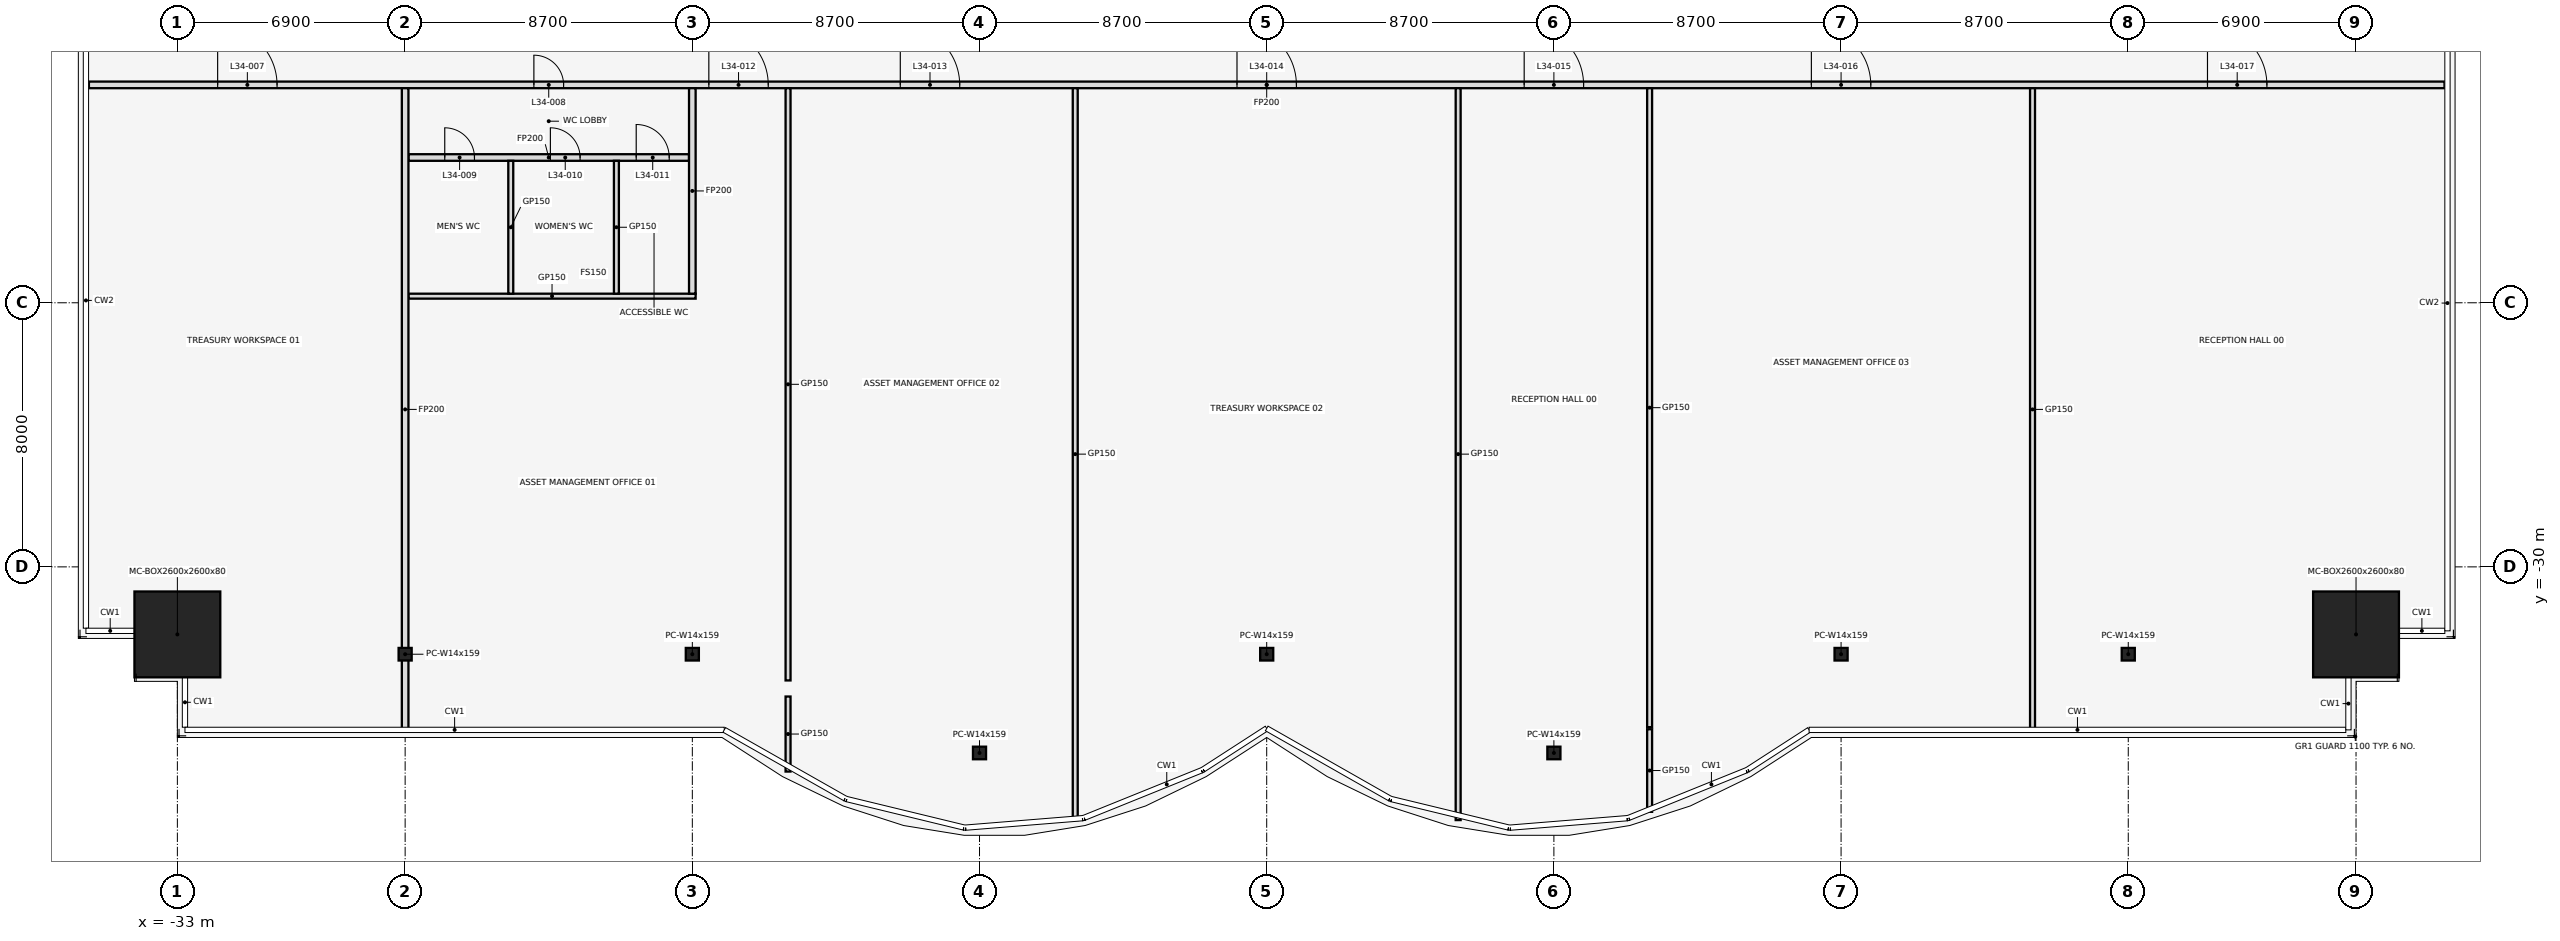
"""IFC4 building model, lengths in metres.
Left out: names, types, materials, properties, quantities, classifications, styles, units other than length and angle.
Written with IfcOpenShell. Run it as: python <this file> out.ifc"""

import sys

from ifc_helpers import new_model, si_unit, direction, frame, frame_2d, origin, origin_2d, place, context, subcontext, project, spatial, rectangle, hollow_rectangle, i_section, extrude, element, fill, save


model = new_model("IFC4")
c1 = context("Model", 3, precision=1e-05, world=origin(), true_north=direction((0.0, 1.0)))
c2 = subcontext(c1, "Body", "Model", "MODEL_VIEW")
j1 = project(units=[si_unit("LENGTHUNIT", "METRE"), si_unit("PLANEANGLEUNIT", "RADIAN")], contexts=[c1])
p1 = place(None, origin())
s1 = spatial("IfcSite", under=j1, at=p1, CompositionType="ELEMENT")
p2 = place(p1, origin())
s2 = spatial("IfcBuilding", under=s1, at=p2, CompositionType="ELEMENT")
p3 = place(p2, frame((0.0, 0.0, 156.8)))
s3 = spatial("IfcBuildingStorey", under=s2, at=p3, CompositionType="ELEMENT", Elevation=156.8)
p4 = place(p3, frame((-33.0, -32.046, 0.0), z_axis=(0.0, 0.0, 1.0), x_axis=(1.0, 0.0, 0.0)))
e1 = element("IfcColumn", 1, at=p4, inside=s3, PredefinedType="COLUMN", context=c2, shape_type="SweptSolid", body=[
    extrude(hollow_rectangle(XDim=2.6, YDim=2.6, WallThickness=0.08, at=origin_2d()), origin(), (0.0, 0.0, 1.0), 4.1),
])
for number, where, z_axis, x_axis in (
    (2, (-26.1, -32.646, 0.0), (0.0, 0.0, 1.0), (1.0, 0.0, 0.0)),
    (3, (-17.4, -32.646, 0.0), (0.0, 0.0, 1.0), (1.0, 0.0, 0.0)),
    (4, (-8.7, -35.637, 0.0), (0.0, 0.0, 1.0), (1.0, 0.0, 0.0)),
    (5, (0.0, -32.646, 0.0), (0.0, 0.0, 1.0), (1.0, 0.0, 0.0)),
    (6, (8.7, -35.637, 0.0), (0.0, 0.0, 1.0), (1.0, 0.0, 0.0)),
    (7, (17.4, -32.646, 0.0), (0.0, 0.0, 1.0), (1.0, 0.0, 0.0)),
    (8, (26.1, -32.646, 0.0), (0.0, 0.0, 1.0), (1.0, 0.0, 0.0)),
):
    element("IfcColumn", number, at=place(p3, frame(where, z_axis=z_axis, x_axis=x_axis)), inside=s3, PredefinedType="COLUMN", context=c2, shape_type="SweptSolid", body=[
        extrude(i_section(OverallWidth=0.396, OverallDepth=0.381, WebThickness=0.019, FlangeThickness=0.03, at=origin_2d()), origin(), (0.0, 0.0, 1.0), 4.1),
    ])
p5 = place(p3, frame((33.0, -32.046, 0.0), z_axis=(0.0, 0.0, 1.0), x_axis=(1.0, 0.0, 0.0)))
e9 = element("IfcColumn", 9, at=p5, inside=s3, PredefinedType="COLUMN", context=c2, shape_type="SweptSolid", body=[
    extrude(hollow_rectangle(XDim=2.6, YDim=2.6, WallThickness=0.08, at=origin_2d()), origin(), (0.0, 0.0, 1.0), 4.1),
])
p6 = place(p3, frame((-26.0, -21.8, 0.0), z_axis=(0.0, 0.0, 1.0), x_axis=(1.0, 0.0, 0.0)))
e10 = element("IfcWall", 10, at=p6, inside=s3, PredefinedType="PARTITIONING", context=c2, shape_type="SweptSolid", body=[
    extrude(rectangle(XDim=8.7, YDim=0.15, at=frame_2d((4.35, 0.0))), origin(), (0.0, 0.0, 1.0), 2.84),
])
p7 = place(p3, frame((-26.0, -17.6, 0.0), z_axis=(0.0, 0.0, 1.0), x_axis=(1.0, 0.0, 0.0)))
e11 = element("IfcWall", 11, at=p7, inside=s3, PredefinedType="PARTITIONING", context=c2, shape_type="SweptSolid", body=[
    extrude(rectangle(XDim=8.5, YDim=0.2, at=frame_2d((4.25, 0.0))), origin(), (0.0, 0.0, 1.0), 2.84),
])
p8 = place(p7, frame((1.1, 0.0, 0.0)))
e12 = element("IfcOpeningElement", 12, at=p8, cuts=e11, PredefinedType="OPENING", context=c2, shape_type="SweptSolid", body=[
    extrude(rectangle(XDim=0.9, YDim=2.1, at=frame_2d((0.45, 1.05))), frame((0.0, 0.112, 0.0), z_axis=(0.0, -1.0, 0.0), x_axis=(1.0, 0.0, 0.0)), (0.0, 0.0, 1.0), 0.224),
])
p9 = place(p7, frame((4.3, 0.0, 0.0)))
e13 = element("IfcOpeningElement", 13, at=p9, cuts=e11, PredefinedType="OPENING", context=c2, shape_type="SweptSolid", body=[
    extrude(rectangle(XDim=0.9, YDim=2.1, at=frame_2d((0.45, 1.05))), frame((0.0, 0.112, 0.0), z_axis=(0.0, -1.0, 0.0), x_axis=(1.0, 0.0, 0.0)), (0.0, 0.0, 1.0), 0.224),
])
p10 = place(p7, frame((6.9, 0.0, 0.0)))
e14 = element("IfcOpeningElement", 14, at=p10, cuts=e11, PredefinedType="OPENING", context=c2, shape_type="SweptSolid", body=[
    extrude(rectangle(XDim=1.0, YDim=2.1, at=frame_2d((0.5, 1.05))), frame((0.0, 0.112, 0.0), z_axis=(0.0, -1.0, 0.0), x_axis=(1.0, 0.0, 0.0)), (0.0, 0.0, 1.0), 0.224),
])
p11 = place(p3, frame((-35.68, -15.4, 0.0), z_axis=(0.0, 0.0, 1.0), x_axis=(1.0, 0.0, 0.0)))
e15 = element("IfcWall", 15, at=p11, inside=s3, PredefinedType="PARTITIONING", context=c2, shape_type="SweptSolid", body=[
    extrude(rectangle(XDim=71.36, YDim=0.2, at=frame_2d((35.68, 0.0))), origin(), (0.0, 0.0, 1.0), 2.84),
])
p12 = place(p11, frame((3.9, 0.0, 0.0)))
e16 = element("IfcOpeningElement", 16, at=p12, cuts=e15, PredefinedType="OPENING", context=c2, shape_type="SweptSolid", body=[
    extrude(rectangle(XDim=1.8, YDim=2.1, at=frame_2d((0.9, 1.05))), frame((0.0, 0.112, 0.0), z_axis=(0.0, -1.0, 0.0), x_axis=(1.0, 0.0, 0.0)), (0.0, 0.0, 1.0), 0.224),
])
p13 = place(p11, frame((13.48, 0.0, 0.0)))
e17 = element("IfcOpeningElement", 17, at=p13, cuts=e15, PredefinedType="OPENING", context=c2, shape_type="SweptSolid", body=[
    extrude(rectangle(XDim=0.9, YDim=2.1, at=frame_2d((0.45, 1.05))), frame((0.0, 0.112, 0.0), z_axis=(0.0, -1.0, 0.0), x_axis=(1.0, 0.0, 0.0)), (0.0, 0.0, 1.0), 0.224),
])
p14 = place(p11, frame((18.78, 0.0, 0.0)))
e18 = element("IfcOpeningElement", 18, at=p14, cuts=e15, PredefinedType="OPENING", context=c2, shape_type="SweptSolid", body=[
    extrude(rectangle(XDim=1.8, YDim=2.1, at=frame_2d((0.9, 1.05))), frame((0.0, 0.112, 0.0), z_axis=(0.0, -1.0, 0.0), x_axis=(1.0, 0.0, 0.0)), (0.0, 0.0, 1.0), 0.224),
])
p15 = place(p11, frame((24.58, 0.0, 0.0)))
e19 = element("IfcOpeningElement", 19, at=p15, cuts=e15, PredefinedType="OPENING", context=c2, shape_type="SweptSolid", body=[
    extrude(rectangle(XDim=1.8, YDim=2.1, at=frame_2d((0.9, 1.05))), frame((0.0, 0.112, 0.0), z_axis=(0.0, -1.0, 0.0), x_axis=(1.0, 0.0, 0.0)), (0.0, 0.0, 1.0), 0.224),
])
p16 = place(p11, frame((34.78, 0.0, 0.0)))
e20 = element("IfcOpeningElement", 20, at=p16, cuts=e15, PredefinedType="OPENING", context=c2, shape_type="SweptSolid", body=[
    extrude(rectangle(XDim=1.8, YDim=2.1, at=frame_2d((0.9, 1.05))), frame((0.0, 0.112, 0.0), z_axis=(0.0, -1.0, 0.0), x_axis=(1.0, 0.0, 0.0)), (0.0, 0.0, 1.0), 0.224),
])
p17 = place(p11, frame((43.48, 0.0, 0.0)))
e21 = element("IfcOpeningElement", 21, at=p17, cuts=e15, PredefinedType="OPENING", context=c2, shape_type="SweptSolid", body=[
    extrude(rectangle(XDim=1.8, YDim=2.1, at=frame_2d((0.9, 1.05))), frame((0.0, 0.112, 0.0), z_axis=(0.0, -1.0, 0.0), x_axis=(1.0, 0.0, 0.0)), (0.0, 0.0, 1.0), 0.224),
])
p18 = place(p11, frame((52.18, 0.0, 0.0)))
e22 = element("IfcOpeningElement", 22, at=p18, cuts=e15, PredefinedType="OPENING", context=c2, shape_type="SweptSolid", body=[
    extrude(rectangle(XDim=1.8, YDim=2.1, at=frame_2d((0.9, 1.05))), frame((0.0, 0.112, 0.0), z_axis=(0.0, -1.0, 0.0), x_axis=(1.0, 0.0, 0.0)), (0.0, 0.0, 1.0), 0.224),
])
p19 = place(p11, frame((64.18, 0.0, 0.0)))
e23 = element("IfcOpeningElement", 23, at=p19, cuts=e15, PredefinedType="OPENING", context=c2, shape_type="SweptSolid", body=[
    extrude(rectangle(XDim=1.8, YDim=2.1, at=frame_2d((0.9, 1.05))), frame((0.0, 0.112, 0.0), z_axis=(0.0, -1.0, 0.0), x_axis=(1.0, 0.0, 0.0)), (0.0, 0.0, 1.0), 0.224),
])
p20 = place(p3, frame((-26.1, -34.96, 0.0), z_axis=(0.0, 0.0, 1.0), x_axis=(0.0, 1.0, 0.0)))
e24 = element("IfcWall", 24, at=p20, inside=s3, PredefinedType="PARTITIONING", context=c2, shape_type="SweptSolid", body=[
    extrude(rectangle(XDim=19.46, YDim=0.2, at=frame_2d((9.73, 0.0))), origin(), (0.0, 0.0, 1.0), 2.84),
])
for number, where, z_axis, x_axis in (
    (25, (-22.9, -21.725, 0.0), (0.0, 0.0, 1.0), (0.0, 1.0, 0.0)),
    (26, (-19.7, -21.725, 0.0), (0.0, 0.0, 1.0), (0.0, 1.0, 0.0)),
):
    element("IfcWall", number, at=place(p3, frame(where, z_axis=z_axis, x_axis=x_axis)), inside=s3, PredefinedType="PARTITIONING", context=c2, shape_type="SweptSolid", body=[
        extrude(rectangle(XDim=4.025, YDim=0.15, at=frame_2d((2.013, 0.0))), origin(), (0.0, 0.0, 1.0), 2.84),
    ])
p21 = place(p3, frame((-17.4, -21.725, 0.0), z_axis=(0.0, 0.0, 1.0), x_axis=(0.0, 1.0, 0.0)))
e27 = element("IfcWall", 27, at=p21, inside=s3, PredefinedType="PARTITIONING", context=c2, shape_type="SweptSolid", body=[
    extrude(rectangle(XDim=6.225, YDim=0.2, at=frame_2d((3.113, 0.0))), origin(), (0.0, 0.0, 1.0), 2.84),
])
p22 = place(p3, frame((-14.5, -36.2, 0.0), z_axis=(0.0, 0.0, 1.0), x_axis=(0.0, 1.0, 0.0)))
e28 = element("IfcWall", 28, at=p22, inside=s3, PredefinedType="PARTITIONING", context=c2, shape_type="SweptSolid", body=[
    extrude(rectangle(XDim=2.272, YDim=0.15, at=frame_2d((1.136, 0.0))), origin(), (0.0, 0.0, 1.0), 2.84),
])
p23 = place(p3, frame((-14.5, -33.44, 0.0), z_axis=(0.0, 0.0, 1.0), x_axis=(0.0, 1.0, 0.0)))
e29 = element("IfcWall", 29, at=p23, inside=s3, PredefinedType="PARTITIONING", context=c2, shape_type="SweptSolid", body=[
    extrude(rectangle(XDim=17.94, YDim=0.15, at=frame_2d((8.97, 0.0))), origin(), (0.0, 0.0, 1.0), 2.84),
])
for number, where, z_axis, x_axis in (
    (30, (-5.8, -37.67, 0.0), (0.0, 0.0, 1.0), (0.0, 1.0, 0.0)),
    (31, (5.8, -37.67, 0.0), (0.0, 0.0, 1.0), (0.0, 1.0, 0.0)),
):
    element("IfcWall", number, at=place(p3, frame(where, z_axis=z_axis, x_axis=x_axis)), inside=s3, PredefinedType="PARTITIONING", context=c2, shape_type="SweptSolid", body=[
        extrude(rectangle(XDim=22.17, YDim=0.15, at=frame_2d((11.085, 0.0))), origin(), (0.0, 0.0, 1.0), 2.84),
    ])
p24 = place(p3, frame((11.6, -37.42, 0.0), z_axis=(0.0, 0.0, 1.0), x_axis=(0.0, 1.0, 0.0)))
e32 = element("IfcWall", 32, at=p24, inside=s3, PredefinedType="PARTITIONING", context=c2, shape_type="SweptSolid", body=[
    extrude(rectangle(XDim=2.502, YDim=0.15, at=frame_2d((1.251, 0.0))), origin(), (0.0, 0.0, 1.0), 2.84),
])
p25 = place(p3, frame((11.6, -34.855, 0.0), z_axis=(0.0, 0.0, 1.0), x_axis=(0.0, 1.0, 0.0)))
e33 = element("IfcWall", 33, at=p25, inside=s3, PredefinedType="PARTITIONING", context=c2, shape_type="SweptSolid", body=[
    extrude(rectangle(XDim=19.355, YDim=0.15, at=frame_2d((9.677, 0.0))), origin(), (0.0, 0.0, 1.0), 2.84),
])
p26 = place(p3, frame((23.2, -34.96, 0.0), z_axis=(0.0, 0.0, 1.0), x_axis=(0.0, 1.0, 0.0)))
e34 = element("IfcWall", 34, at=p26, inside=s3, PredefinedType="PARTITIONING", context=c2, shape_type="SweptSolid", body=[
    extrude(rectangle(XDim=19.46, YDim=0.15, at=frame_2d((9.73, 0.0))), origin(), (0.0, 0.0, 1.0), 2.84),
])
p27 = place(p12, origin())
e35 = element("IfcDoor", 35, at=p27, inside=s3, OperationType="SINGLE_SWING_LEFT", PredefinedType="DOOR", context=c2, shape_type="SweptSolid", body=[
    extrude(rectangle(XDim=1.8, YDim=2.1, at=frame_2d((0.9, 1.05))), frame((0.0, 0.025, 0.0), z_axis=(0.0, -1.0, 0.0), x_axis=(1.0, 0.0, 0.0)), (0.0, 0.0, 1.0), 0.05),
])
fill(e16, e35)
p28 = place(p13, frame((0.9, 0.0, 0.0), z_axis=(0.0, 0.0, 1.0), x_axis=(-1.0, 0.0, 0.0)))
e36 = element("IfcDoor", 36, at=p28, inside=s3, OperationType="SINGLE_SWING_RIGHT", PredefinedType="DOOR", context=c2, shape_type="SweptSolid", body=[
    extrude(rectangle(XDim=0.9, YDim=2.1, at=frame_2d((0.45, 1.05))), frame((0.0, 0.025, 0.0), z_axis=(0.0, -1.0, 0.0), x_axis=(1.0, 0.0, 0.0)), (0.0, 0.0, 1.0), 0.05),
])
fill(e17, e36)
p29 = place(p8, frame((0.9, 0.0, 0.0), z_axis=(0.0, 0.0, 1.0), x_axis=(-1.0, 0.0, 0.0)))
e37 = element("IfcDoor", 37, at=p29, inside=s3, OperationType="SINGLE_SWING_RIGHT", PredefinedType="DOOR", context=c2, shape_type="SweptSolid", body=[
    extrude(rectangle(XDim=0.9, YDim=2.1, at=frame_2d((0.45, 1.05))), frame((0.0, 0.025, 0.0), z_axis=(0.0, -1.0, 0.0), x_axis=(1.0, 0.0, 0.0)), (0.0, 0.0, 1.0), 0.05),
])
fill(e12, e37)
p30 = place(p9, frame((0.9, 0.0, 0.0), z_axis=(0.0, 0.0, 1.0), x_axis=(-1.0, 0.0, 0.0)))
e38 = element("IfcDoor", 38, at=p30, inside=s3, OperationType="SINGLE_SWING_LEFT", PredefinedType="DOOR", context=c2, shape_type="SweptSolid", body=[
    extrude(rectangle(XDim=0.9, YDim=2.1, at=frame_2d((0.45, 1.05))), frame((0.0, 0.025, 0.0), z_axis=(0.0, -1.0, 0.0), x_axis=(1.0, 0.0, 0.0)), (0.0, 0.0, 1.0), 0.05),
])
fill(e13, e38)
p31 = place(p10, frame((1.0, 0.0, 0.0), z_axis=(0.0, 0.0, 1.0), x_axis=(-1.0, 0.0, 0.0)))
e39 = element("IfcDoor", 39, at=p31, inside=s3, OperationType="SINGLE_SWING_RIGHT", PredefinedType="DOOR", context=c2, shape_type="SweptSolid", body=[
    extrude(rectangle(XDim=1.0, YDim=2.1, at=frame_2d((0.5, 1.05))), frame((0.0, 0.025, 0.0), z_axis=(0.0, -1.0, 0.0), x_axis=(1.0, 0.0, 0.0)), (0.0, 0.0, 1.0), 0.05),
])
fill(e14, e39)
p32 = place(p14, origin())
e40 = element("IfcDoor", 40, at=p32, inside=s3, OperationType="SINGLE_SWING_LEFT", PredefinedType="DOOR", context=c2, shape_type="SweptSolid", body=[
    extrude(rectangle(XDim=1.8, YDim=2.1, at=frame_2d((0.9, 1.05))), frame((0.0, 0.025, 0.0), z_axis=(0.0, -1.0, 0.0), x_axis=(1.0, 0.0, 0.0)), (0.0, 0.0, 1.0), 0.05),
])
fill(e18, e40)
p33 = place(p15, origin())
e41 = element("IfcDoor", 41, at=p33, inside=s3, OperationType="SINGLE_SWING_LEFT", PredefinedType="DOOR", context=c2, shape_type="SweptSolid", body=[
    extrude(rectangle(XDim=1.8, YDim=2.1, at=frame_2d((0.9, 1.05))), frame((0.0, 0.025, 0.0), z_axis=(0.0, -1.0, 0.0), x_axis=(1.0, 0.0, 0.0)), (0.0, 0.0, 1.0), 0.05),
])
fill(e19, e41)
p34 = place(p16, origin())
e42 = element("IfcDoor", 42, at=p34, inside=s3, OperationType="SINGLE_SWING_LEFT", PredefinedType="DOOR", context=c2, shape_type="SweptSolid", body=[
    extrude(rectangle(XDim=1.8, YDim=2.1, at=frame_2d((0.9, 1.05))), frame((0.0, 0.025, 0.0), z_axis=(0.0, -1.0, 0.0), x_axis=(1.0, 0.0, 0.0)), (0.0, 0.0, 1.0), 0.05),
])
fill(e20, e42)
p35 = place(p17, origin())
e43 = element("IfcDoor", 43, at=p35, inside=s3, OperationType="SINGLE_SWING_LEFT", PredefinedType="DOOR", context=c2, shape_type="SweptSolid", body=[
    extrude(rectangle(XDim=1.8, YDim=2.1, at=frame_2d((0.9, 1.05))), frame((0.0, 0.025, 0.0), z_axis=(0.0, -1.0, 0.0), x_axis=(1.0, 0.0, 0.0)), (0.0, 0.0, 1.0), 0.05),
])
fill(e21, e43)
p36 = place(p18, origin())
e44 = element("IfcDoor", 44, at=p36, inside=s3, OperationType="SINGLE_SWING_LEFT", PredefinedType="DOOR", context=c2, shape_type="SweptSolid", body=[
    extrude(rectangle(XDim=1.8, YDim=2.1, at=frame_2d((0.9, 1.05))), frame((0.0, 0.025, 0.0), z_axis=(0.0, -1.0, 0.0), x_axis=(1.0, 0.0, 0.0)), (0.0, 0.0, 1.0), 0.05),
])
fill(e22, e44)
p37 = place(p19, origin())
e45 = element("IfcDoor", 45, at=p37, inside=s3, OperationType="SINGLE_SWING_LEFT", PredefinedType="DOOR", context=c2, shape_type="SweptSolid", body=[
    extrude(rectangle(XDim=1.8, YDim=2.1, at=frame_2d((0.9, 1.05))), frame((0.0, 0.025, 0.0), z_axis=(0.0, -1.0, 0.0), x_axis=(1.0, 0.0, 0.0)), (0.0, 0.0, 1.0), 0.05),
])
fill(e23, e45)
save(model, sys.argv[1])
